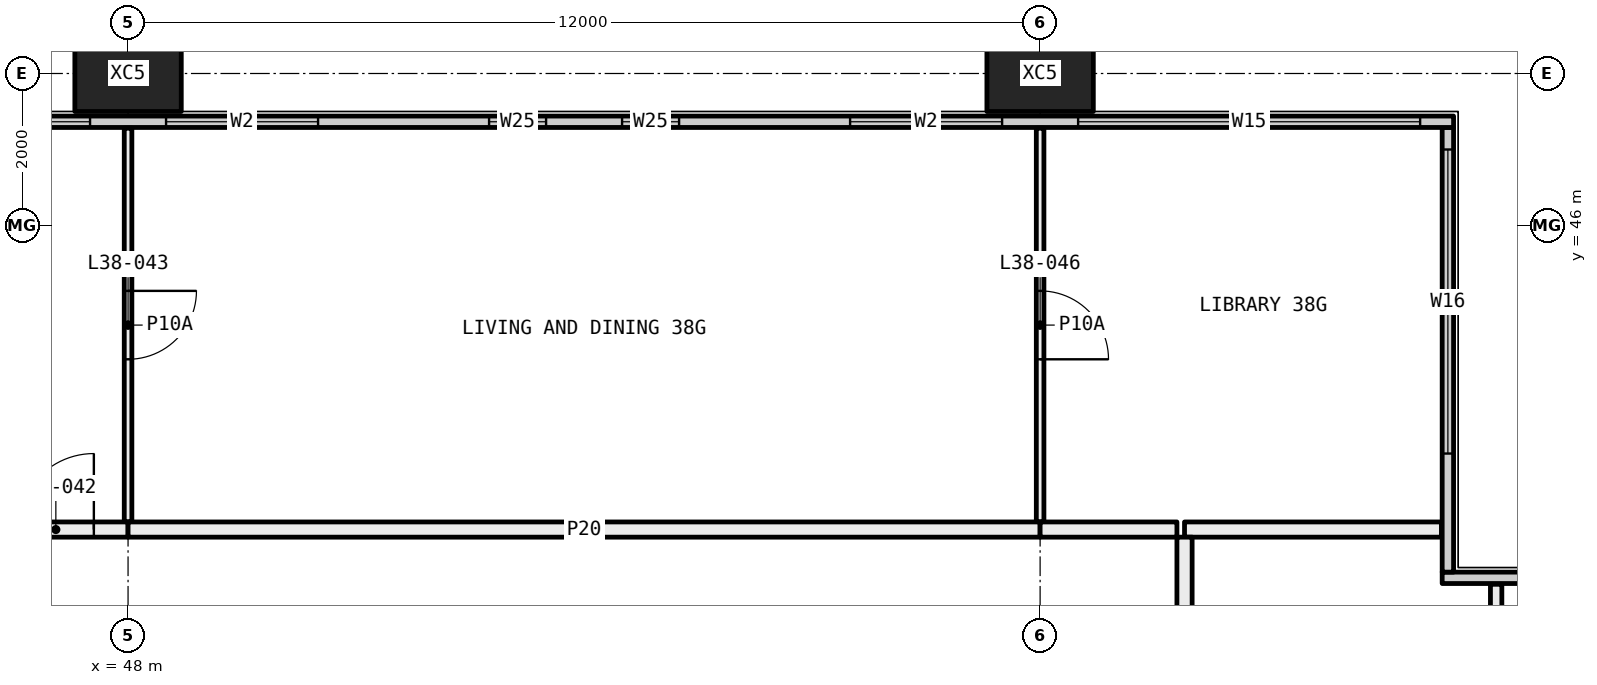
"""IFC4 building model, lengths in metres.
Left out: names, types, materials, properties, quantities, classifications, styles, units other than length and angle.
Written with IfcOpenShell. Run it as: python <this file> out.ifc"""

import sys

from ifc_helpers import new_model, si_unit, direction, frame, frame_2d, origin, origin_2d, place, context, subcontext, project, spatial, rectangle, hollow_rectangle, extrude, element, fill, save


model = new_model("IFC4")
c1 = context("Model", 3, precision=1e-05, world=origin(), true_north=direction((0.0, 1.0)))
c2 = subcontext(c1, "Body", "Model", "MODEL_VIEW")
j1 = project(units=[si_unit("LENGTHUNIT", "METRE"), si_unit("PLANEANGLEUNIT", "RADIAN")], contexts=[c1])
p1 = place(None, origin())
s1 = spatial("IfcSite", under=j1, at=p1, CompositionType="ELEMENT")
p2 = place(p1, origin())
s2 = spatial("IfcBuilding", under=s1, at=p2, CompositionType="ELEMENT")
p3 = place(p2, frame((0.0, 0.0, 144.9)))
s3 = spatial("IfcBuildingStorey", under=s2, at=p3, CompositionType="ELEMENT", Elevation=144.9)
for number, where, z_axis, x_axis in (
    (1, (48.0, 48.0, -0.4), (0.0, 0.0, 1.0), (1.0, 0.0, 0.0)),
    (2, (60.0, 48.0, -0.4), (0.0, 0.0, 1.0), (1.0, 0.0, 0.0)),
):
    element("IfcColumn", number, at=place(p3, frame(where, z_axis=z_axis, x_axis=x_axis)), inside=s3, PredefinedType="COLUMN", context=c2, shape_type="SweptSolid", body=[
        extrude(hollow_rectangle(XDim=1.4, YDim=1.0, WallThickness=0.055, at=origin_2d()), origin(), (0.0, 0.0, 1.0), 3.45),
    ])
p4 = place(p3, frame((65.29, 41.365, 0.0), z_axis=(0.0, 0.0, 1.0), x_axis=(1.0, 0.0, 0.0)))
e3 = element("IfcWall", 3, at=p4, inside=s3, PredefinedType="ELEMENTEDWALL", context=c2, shape_type="SweptSolid", body=[
    extrude(rectangle(XDim=6.15, YDim=0.15, at=frame_2d((3.075, 0.0))), origin(), (0.0, 0.0, 1.0), 3.05),
])
p5 = place(p4, frame((1.71, 0.0, 0.45)))
e4 = element("IfcOpeningElement", 4, at=p5, cuts=e3, PredefinedType="OPENING", context=c2, shape_type="SweptSolid", body=[
    extrude(rectangle(XDim=4.0, YDim=2.55, at=frame_2d((2.0, 1.275))), frame((0.0, 0.085, 0.0), z_axis=(0.0, -1.0, 0.0), x_axis=(1.0, 0.0, 0.0)), (0.0, 0.0, 1.0), 0.17),
])
p6 = place(p3, frame((65.365, 41.44, 0.0), z_axis=(0.0, 0.0, 1.0), x_axis=(0.0, 1.0, 0.0)))
e5 = element("IfcWall", 5, at=p6, inside=s3, PredefinedType="ELEMENTEDWALL", context=c2, shape_type="SweptSolid", body=[
    extrude(rectangle(XDim=5.85, YDim=0.15, at=frame_2d((2.925, 0.0))), origin(), (0.0, 0.0, 1.0), 3.05),
])
p7 = place(p6, frame((1.56, 0.0, 0.45)))
e6 = element("IfcOpeningElement", 6, at=p7, cuts=e5, PredefinedType="OPENING", context=c2, shape_type="SweptSolid", body=[
    extrude(rectangle(XDim=4.0, YDim=2.55, at=frame_2d((2.0, 1.275))), frame((0.0, 0.085, 0.0), z_axis=(0.0, -1.0, 0.0), x_axis=(1.0, 0.0, 0.0)), (0.0, 0.0, 1.0), 0.17),
])
p8 = place(p3, frame((6.56, 47.365, 0.0), z_axis=(0.0, 0.0, 1.0), x_axis=(1.0, 0.0, 0.0)))
e7 = element("IfcWall", 7, at=p8, inside=s3, PredefinedType="ELEMENTEDWALL", context=c2, shape_type="SweptSolid", body=[
    extrude(rectangle(XDim=58.88, YDim=0.15, at=frame_2d((29.44, 0.0))), origin(), (0.0, 0.0, 1.0), 3.05),
])
p9 = place(p8, frame((0.44, 0.0, 0.45)))
e8 = element("IfcOpeningElement", 8, at=p9, cuts=e7, PredefinedType="OPENING", context=c2, shape_type="SweptSolid", body=[
    extrude(rectangle(XDim=4.5, YDim=2.55, at=frame_2d((2.25, 1.275))), frame((0.0, 0.085, 0.0), z_axis=(0.0, -1.0, 0.0), x_axis=(1.0, 0.0, 0.0)), (0.0, 0.0, 1.0), 0.17),
])
p10 = place(p8, frame((5.94, 0.0, 0.45)))
e9 = element("IfcOpeningElement", 9, at=p10, cuts=e7, PredefinedType="OPENING", context=c2, shape_type="SweptSolid", body=[
    extrude(rectangle(XDim=2.0, YDim=2.55, at=frame_2d((1.0, 1.275))), frame((0.0, 0.085, 0.0), z_axis=(0.0, -1.0, 0.0), x_axis=(1.0, 0.0, 0.0)), (0.0, 0.0, 1.0), 0.17),
])
p11 = place(p8, frame((10.19, 0.0, 0.45)))
e10 = element("IfcOpeningElement", 10, at=p11, cuts=e7, PredefinedType="OPENING", context=c2, shape_type="SweptSolid", body=[
    extrude(rectangle(XDim=0.75, YDim=2.55, at=frame_2d((0.375, 1.275))), frame((0.0, 0.085, 0.0), z_axis=(0.0, -1.0, 0.0), x_axis=(1.0, 0.0, 0.0)), (0.0, 0.0, 1.0), 0.17),
])
p12 = place(p8, frame((11.94, 0.0, 0.45)))
e11 = element("IfcOpeningElement", 11, at=p12, cuts=e7, PredefinedType="OPENING", context=c2, shape_type="SweptSolid", body=[
    extrude(rectangle(XDim=0.75, YDim=2.55, at=frame_2d((0.375, 1.275))), frame((0.0, 0.085, 0.0), z_axis=(0.0, -1.0, 0.0), x_axis=(1.0, 0.0, 0.0)), (0.0, 0.0, 1.0), 0.17),
])
p13 = place(p8, frame((14.94, 0.0, 0.45)))
e12 = element("IfcOpeningElement", 12, at=p13, cuts=e7, PredefinedType="OPENING", context=c2, shape_type="SweptSolid", body=[
    extrude(rectangle(XDim=2.0, YDim=2.55, at=frame_2d((1.0, 1.275))), frame((0.0, 0.085, 0.0), z_axis=(0.0, -1.0, 0.0), x_axis=(1.0, 0.0, 0.0)), (0.0, 0.0, 1.0), 0.17),
])
p14 = place(p8, frame((17.94, 0.0, 0.45)))
e13 = element("IfcOpeningElement", 13, at=p14, cuts=e7, PredefinedType="OPENING", context=c2, shape_type="SweptSolid", body=[
    extrude(rectangle(XDim=2.0, YDim=2.55, at=frame_2d((1.0, 1.275))), frame((0.0, 0.085, 0.0), z_axis=(0.0, -1.0, 0.0), x_axis=(1.0, 0.0, 0.0)), (0.0, 0.0, 1.0), 0.17),
])
p15 = place(p8, frame((22.19, 0.0, 0.45)))
e14 = element("IfcOpeningElement", 14, at=p15, cuts=e7, PredefinedType="OPENING", context=c2, shape_type="SweptSolid", body=[
    extrude(rectangle(XDim=0.75, YDim=2.55, at=frame_2d((0.375, 1.275))), frame((0.0, 0.085, 0.0), z_axis=(0.0, -1.0, 0.0), x_axis=(1.0, 0.0, 0.0)), (0.0, 0.0, 1.0), 0.17),
])
p16 = place(p8, frame((23.94, 0.0, 0.45)))
e15 = element("IfcOpeningElement", 15, at=p16, cuts=e7, PredefinedType="OPENING", context=c2, shape_type="SweptSolid", body=[
    extrude(rectangle(XDim=0.75, YDim=2.55, at=frame_2d((0.375, 1.275))), frame((0.0, 0.085, 0.0), z_axis=(0.0, -1.0, 0.0), x_axis=(1.0, 0.0, 0.0)), (0.0, 0.0, 1.0), 0.17),
])
p17 = place(p8, frame((26.94, 0.0, 0.45)))
e16 = element("IfcOpeningElement", 16, at=p17, cuts=e7, PredefinedType="OPENING", context=c2, shape_type="SweptSolid", body=[
    extrude(rectangle(XDim=2.0, YDim=2.55, at=frame_2d((1.0, 1.275))), frame((0.0, 0.085, 0.0), z_axis=(0.0, -1.0, 0.0), x_axis=(1.0, 0.0, 0.0)), (0.0, 0.0, 1.0), 0.17),
])
p18 = place(p8, frame((29.94, 0.0, 0.45)))
e17 = element("IfcOpeningElement", 17, at=p18, cuts=e7, PredefinedType="OPENING", context=c2, shape_type="SweptSolid", body=[
    extrude(rectangle(XDim=2.0, YDim=2.55, at=frame_2d((1.0, 1.275))), frame((0.0, 0.085, 0.0), z_axis=(0.0, -1.0, 0.0), x_axis=(1.0, 0.0, 0.0)), (0.0, 0.0, 1.0), 0.17),
])
p19 = place(p8, frame((34.19, 0.0, 0.45)))
e18 = element("IfcOpeningElement", 18, at=p19, cuts=e7, PredefinedType="OPENING", context=c2, shape_type="SweptSolid", body=[
    extrude(rectangle(XDim=0.75, YDim=2.55, at=frame_2d((0.375, 1.275))), frame((0.0, 0.085, 0.0), z_axis=(0.0, -1.0, 0.0), x_axis=(1.0, 0.0, 0.0)), (0.0, 0.0, 1.0), 0.17),
])
p20 = place(p8, frame((35.94, 0.0, 0.45)))
e19 = element("IfcOpeningElement", 19, at=p20, cuts=e7, PredefinedType="OPENING", context=c2, shape_type="SweptSolid", body=[
    extrude(rectangle(XDim=0.75, YDim=2.55, at=frame_2d((0.375, 1.275))), frame((0.0, 0.085, 0.0), z_axis=(0.0, -1.0, 0.0), x_axis=(1.0, 0.0, 0.0)), (0.0, 0.0, 1.0), 0.17),
])
p21 = place(p8, frame((38.94, 0.0, 0.45)))
e20 = element("IfcOpeningElement", 20, at=p21, cuts=e7, PredefinedType="OPENING", context=c2, shape_type="SweptSolid", body=[
    extrude(rectangle(XDim=2.0, YDim=2.55, at=frame_2d((1.0, 1.275))), frame((0.0, 0.085, 0.0), z_axis=(0.0, -1.0, 0.0), x_axis=(1.0, 0.0, 0.0)), (0.0, 0.0, 1.0), 0.17),
])
p22 = place(p8, frame((41.94, 0.0, 0.45)))
e21 = element("IfcOpeningElement", 21, at=p22, cuts=e7, PredefinedType="OPENING", context=c2, shape_type="SweptSolid", body=[
    extrude(rectangle(XDim=2.0, YDim=2.55, at=frame_2d((1.0, 1.275))), frame((0.0, 0.085, 0.0), z_axis=(0.0, -1.0, 0.0), x_axis=(1.0, 0.0, 0.0)), (0.0, 0.0, 1.0), 0.17),
])
p23 = place(p8, frame((46.19, 0.0, 0.45)))
e22 = element("IfcOpeningElement", 22, at=p23, cuts=e7, PredefinedType="OPENING", context=c2, shape_type="SweptSolid", body=[
    extrude(rectangle(XDim=0.75, YDim=2.55, at=frame_2d((0.375, 1.275))), frame((0.0, 0.085, 0.0), z_axis=(0.0, -1.0, 0.0), x_axis=(1.0, 0.0, 0.0)), (0.0, 0.0, 1.0), 0.17),
])
p24 = place(p8, frame((47.94, 0.0, 0.45)))
e23 = element("IfcOpeningElement", 23, at=p24, cuts=e7, PredefinedType="OPENING", context=c2, shape_type="SweptSolid", body=[
    extrude(rectangle(XDim=0.75, YDim=2.55, at=frame_2d((0.375, 1.275))), frame((0.0, 0.085, 0.0), z_axis=(0.0, -1.0, 0.0), x_axis=(1.0, 0.0, 0.0)), (0.0, 0.0, 1.0), 0.17),
])
p25 = place(p8, frame((50.94, 0.0, 0.45)))
e24 = element("IfcOpeningElement", 24, at=p25, cuts=e7, PredefinedType="OPENING", context=c2, shape_type="SweptSolid", body=[
    extrude(rectangle(XDim=2.0, YDim=2.55, at=frame_2d((1.0, 1.275))), frame((0.0, 0.085, 0.0), z_axis=(0.0, -1.0, 0.0), x_axis=(1.0, 0.0, 0.0)), (0.0, 0.0, 1.0), 0.17),
])
p26 = place(p8, frame((53.94, 0.0, 0.45)))
e25 = element("IfcOpeningElement", 25, at=p26, cuts=e7, PredefinedType="OPENING", context=c2, shape_type="SweptSolid", body=[
    extrude(rectangle(XDim=4.5, YDim=2.55, at=frame_2d((2.25, 1.275))), frame((0.0, 0.085, 0.0), z_axis=(0.0, -1.0, 0.0), x_axis=(1.0, 0.0, 0.0)), (0.0, 0.0, 1.0), 0.17),
])
p27 = place(p3, frame((66.0, 41.28, 0.0), z_axis=(0.0, 0.0, 1.0), x_axis=(0.0, -1.0, 0.0)))
e26 = element("IfcWall", 26, at=p27, inside=s3, PredefinedType="PARTITIONING", context=c2, shape_type="SweptSolid", body=[
    extrude(rectangle(XDim=3.78, YDim=0.15, at=frame_2d((1.89, 0.0))), origin(), (0.0, 0.0, 1.0), 3.05),
])
p28 = place(p3, frame((65.28, 42.0, 0.0), z_axis=(0.0, 0.0, 1.0), x_axis=(-1.0, 0.0, 0.0)))
e27 = element("IfcWall", 27, at=p28, inside=s3, PredefinedType="PARTITIONING", context=c2, shape_type="SweptSolid", body=[
    extrude(rectangle(XDim=3.38, YDim=0.2, at=frame_2d((1.69, 0.0))), origin(), (0.0, 0.0, 1.0), 3.05),
])
p29 = place(p3, frame((61.9, 41.9, 0.0), z_axis=(0.0, 0.0, 1.0), x_axis=(0.0, -1.0, 0.0)))
e28 = element("IfcWall", 28, at=p29, inside=s3, PredefinedType="PARTITIONING", context=c2, shape_type="SweptSolid", body=[
    extrude(rectangle(XDim=4.4, YDim=0.2, at=frame_2d((2.2, 0.0))), origin(), (0.0, 0.0, 1.0), 3.05),
])
p30 = place(p3, frame((48.0, 42.1, 0.0), z_axis=(0.0, 0.0, 1.0), x_axis=(0.0, 1.0, 0.0)))
e29 = element("IfcWall", 29, at=p30, inside=s3, PredefinedType="PARTITIONING", context=c2, shape_type="SweptSolid", body=[
    extrude(rectangle(XDim=5.18, YDim=0.1, at=frame_2d((2.59, 0.0))), origin(), (0.0, 0.0, 1.0), 3.05),
])
p31 = place(p30, frame((2.14, 0.0, 0.0)))
e30 = element("IfcOpeningElement", 30, at=p31, cuts=e29, PredefinedType="OPENING", context=c2, shape_type="SweptSolid", body=[
    extrude(rectangle(XDim=0.9, YDim=2.1, at=frame_2d((0.45, 1.05))), frame((0.0, 0.06, 0.0), z_axis=(0.0, -1.0, 0.0), x_axis=(1.0, 0.0, 0.0)), (0.0, 0.0, 1.0), 0.12),
])
p32 = place(p3, frame((46.1, 42.0, 0.0), z_axis=(0.0, 0.0, 1.0), x_axis=(1.0, 0.0, 0.0)))
e31 = element("IfcWall", 31, at=p32, inside=s3, PredefinedType="PARTITIONING", context=c2, shape_type="SweptSolid", body=[
    extrude(rectangle(XDim=1.9, YDim=0.2, at=frame_2d((0.95, 0.0))), origin(), (0.0, 0.0, 1.0), 3.05),
])
p33 = place(p32, frame((0.45, 0.0, 0.0)))
e32 = element("IfcOpeningElement", 32, at=p33, cuts=e31, PredefinedType="OPENING", context=c2, shape_type="SweptSolid", body=[
    extrude(rectangle(XDim=1.0, YDim=2.1, at=frame_2d((0.5, 1.05))), frame((0.0, 0.11, 0.0), z_axis=(0.0, -1.0, 0.0), x_axis=(1.0, 0.0, 0.0)), (0.0, 0.0, 1.0), 0.22),
])
p34 = place(p3, frame((60.0, 42.1, 0.0), z_axis=(0.0, 0.0, 1.0), x_axis=(0.0, 1.0, 0.0)))
e33 = element("IfcWall", 33, at=p34, inside=s3, PredefinedType="PARTITIONING", context=c2, shape_type="SweptSolid", body=[
    extrude(rectangle(XDim=5.18, YDim=0.1, at=frame_2d((2.59, 0.0))), origin(), (0.0, 0.0, 1.0), 3.05),
])
p35 = place(p34, frame((2.14, 0.0, 0.0)))
e34 = element("IfcOpeningElement", 34, at=p35, cuts=e33, PredefinedType="OPENING", context=c2, shape_type="SweptSolid", body=[
    extrude(rectangle(XDim=0.9, YDim=2.1, at=frame_2d((0.45, 1.05))), frame((0.0, 0.06, 0.0), z_axis=(0.0, -1.0, 0.0), x_axis=(1.0, 0.0, 0.0)), (0.0, 0.0, 1.0), 0.12),
])
p36 = place(p3, frame((48.0, 42.0, 0.0), z_axis=(0.0, 0.0, 1.0), x_axis=(1.0, 0.0, 0.0)))
e35 = element("IfcWall", 35, at=p36, inside=s3, PredefinedType="PARTITIONING", context=c2, shape_type="SweptSolid", body=[
    extrude(rectangle(XDim=12.0, YDim=0.2, at=frame_2d((6.0, 0.0))), origin(), (0.0, 0.0, 1.0), 3.05),
])
p37 = place(p3, frame((60.0, 42.0, 0.0), z_axis=(0.0, 0.0, 1.0), x_axis=(1.0, 0.0, 0.0)))
e36 = element("IfcWall", 36, at=p37, inside=s3, PredefinedType="PARTITIONING", context=c2, shape_type="SweptSolid", body=[
    extrude(rectangle(XDim=1.8, YDim=0.2, at=frame_2d((0.9, 0.0))), origin(), (0.0, 0.0, 1.0), 3.05),
])
p38 = place(p7, origin())
e37 = element("IfcWindow", 37, at=p38, inside=s3, PartitioningType="SINGLE_PANEL", PredefinedType="WINDOW", context=c2, shape_type="SweptSolid", body=[
    extrude(rectangle(XDim=4.0, YDim=2.55, at=frame_2d((2.0, 1.275))), frame((0.0, 0.03, 0.0), z_axis=(0.0, -1.0, 0.0), x_axis=(1.0, 0.0, 0.0)), (0.0, 0.0, 1.0), 0.06),
])
fill(e6, e37)
p39 = place(p21, origin())
e38 = element("IfcWindow", 38, at=p39, inside=s3, PartitioningType="SINGLE_PANEL", PredefinedType="WINDOW", context=c2, shape_type="SweptSolid", body=[
    extrude(rectangle(XDim=2.0, YDim=2.55, at=frame_2d((1.0, 1.275))), frame((0.0, 0.03, 0.0), z_axis=(0.0, -1.0, 0.0), x_axis=(1.0, 0.0, 0.0)), (0.0, 0.0, 1.0), 0.06),
])
fill(e20, e38)
p40 = place(p22, origin())
e39 = element("IfcWindow", 39, at=p40, inside=s3, PartitioningType="SINGLE_PANEL", PredefinedType="WINDOW", context=c2, shape_type="SweptSolid", body=[
    extrude(rectangle(XDim=2.0, YDim=2.55, at=frame_2d((1.0, 1.275))), frame((0.0, 0.03, 0.0), z_axis=(0.0, -1.0, 0.0), x_axis=(1.0, 0.0, 0.0)), (0.0, 0.0, 1.0), 0.06),
])
fill(e21, e39)
p41 = place(p23, origin())
e40 = element("IfcWindow", 40, at=p41, inside=s3, PartitioningType="SINGLE_PANEL", PredefinedType="WINDOW", context=c2, shape_type="SweptSolid", body=[
    extrude(rectangle(XDim=0.75, YDim=2.55, at=frame_2d((0.375, 1.275))), frame((0.0, 0.03, 0.0), z_axis=(0.0, -1.0, 0.0), x_axis=(1.0, 0.0, 0.0)), (0.0, 0.0, 1.0), 0.06),
])
fill(e22, e40)
p42 = place(p24, origin())
e41 = element("IfcWindow", 41, at=p42, inside=s3, PartitioningType="SINGLE_PANEL", PredefinedType="WINDOW", context=c2, shape_type="SweptSolid", body=[
    extrude(rectangle(XDim=0.75, YDim=2.55, at=frame_2d((0.375, 1.275))), frame((0.0, 0.03, 0.0), z_axis=(0.0, -1.0, 0.0), x_axis=(1.0, 0.0, 0.0)), (0.0, 0.0, 1.0), 0.06),
])
fill(e23, e41)
p43 = place(p25, origin())
e42 = element("IfcWindow", 42, at=p43, inside=s3, PartitioningType="SINGLE_PANEL", PredefinedType="WINDOW", context=c2, shape_type="SweptSolid", body=[
    extrude(rectangle(XDim=2.0, YDim=2.55, at=frame_2d((1.0, 1.275))), frame((0.0, 0.03, 0.0), z_axis=(0.0, -1.0, 0.0), x_axis=(1.0, 0.0, 0.0)), (0.0, 0.0, 1.0), 0.06),
])
fill(e24, e42)
p44 = place(p26, origin())
e43 = element("IfcWindow", 43, at=p44, inside=s3, PartitioningType="SINGLE_PANEL", PredefinedType="WINDOW", context=c2, shape_type="SweptSolid", body=[
    extrude(rectangle(XDim=4.5, YDim=2.55, at=frame_2d((2.25, 1.275))), frame((0.0, 0.03, 0.0), z_axis=(0.0, -1.0, 0.0), x_axis=(1.0, 0.0, 0.0)), (0.0, 0.0, 1.0), 0.06),
])
fill(e25, e43)
p45 = place(p33, origin())
e44 = element("IfcDoor", 44, at=p45, inside=s3, OperationType="SINGLE_SWING_LEFT", PredefinedType="DOOR", context=c2, shape_type="SweptSolid", body=[
    extrude(rectangle(XDim=1.0, YDim=2.1, at=frame_2d((0.5, 1.05))), frame((0.0, 0.025, 0.0), z_axis=(0.0, -1.0, 0.0), x_axis=(1.0, 0.0, 0.0)), (0.0, 0.0, 1.0), 0.05),
])
fill(e32, e44)
p46 = place(p31, frame((0.9, 0.0, 0.0), x_axis=(-1.0, 0.0, 0.0)))
e45 = element("IfcDoor", 45, at=p46, inside=s3, OperationType="SINGLE_SWING_RIGHT", PredefinedType="DOOR", context=c2, shape_type="SweptSolid", body=[
    extrude(rectangle(XDim=0.9, YDim=2.1, at=frame_2d((0.45, 1.05))), frame((0.0, 0.025, 0.0), z_axis=(0.0, -1.0, 0.0), x_axis=(1.0, 0.0, 0.0)), (0.0, 0.0, 1.0), 0.05),
])
fill(e30, e45)
p47 = place(p35, frame((0.9, 0.0, 0.0), x_axis=(-1.0, 0.0, 0.0)))
e46 = element("IfcDoor", 46, at=p47, inside=s3, OperationType="SINGLE_SWING_LEFT", PredefinedType="DOOR", context=c2, shape_type="SweptSolid", body=[
    extrude(rectangle(XDim=0.9, YDim=2.1, at=frame_2d((0.45, 1.05))), frame((0.0, 0.025, 0.0), z_axis=(0.0, -1.0, 0.0), x_axis=(1.0, 0.0, 0.0)), (0.0, 0.0, 1.0), 0.05),
])
fill(e34, e46)
save(model, sys.argv[1])
